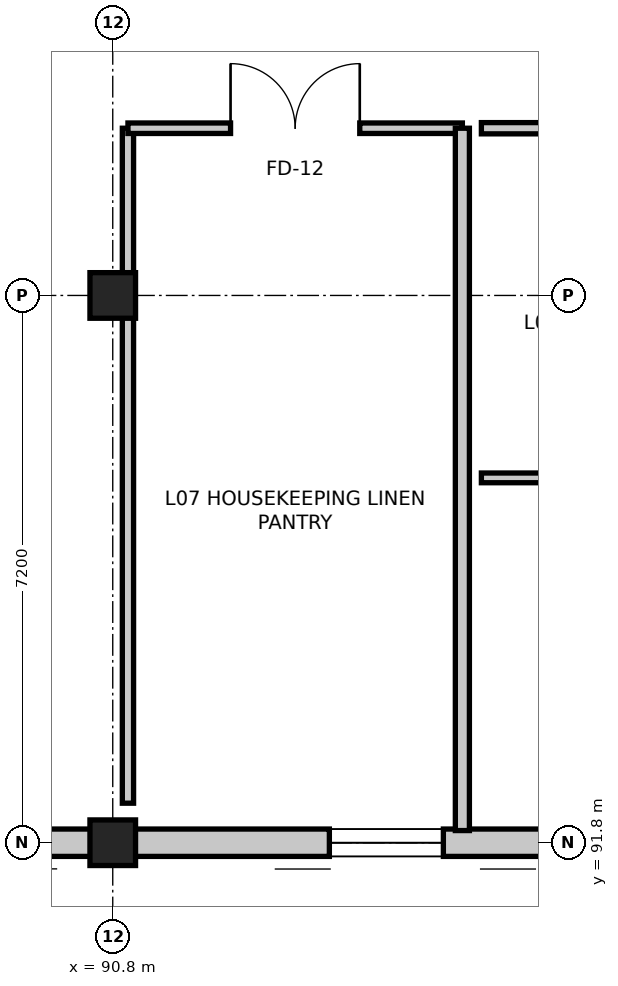
"""IFC4 building model, lengths in metres.
Left out: names, types, materials, properties, quantities, classifications, styles, units other than length and angle.
Written with IfcOpenShell. Run it as: python <this file> out.ifc"""

import sys

from ifc_helpers import new_model, si_unit, direction, frame, frame_2d, origin, origin_2d, place, context, subcontext, project, spatial, rectangle, extrude, element, fill, save


model = new_model("IFC4")
c1 = context("Model", 3, precision=1e-05, world=origin(), true_north=direction((0.0, 1.0)))
c2 = subcontext(c1, "Body", "Model", "MODEL_VIEW")
j1 = project(units=[si_unit("LENGTHUNIT", "METRE"), si_unit("PLANEANGLEUNIT", "RADIAN")], contexts=[c1])
p1 = place(None, origin())
s1 = spatial("IfcSite", under=j1, at=p1, CompositionType="ELEMENT")
p2 = place(p1, origin())
s2 = spatial("IfcBuilding", under=s1, at=p2, CompositionType="ELEMENT")
p3 = place(p2, frame((0.0, 0.0, 30.0)))
s3 = spatial("IfcBuildingStorey", under=s2, at=p3, CompositionType="ELEMENT", Elevation=30.0)
for number, where, z_axis, x_axis in (
    (1, (90.8, 91.8, 0.0), (0.0, 0.0, 1.0), (1.0, 0.0, 0.0)),
    (2, (90.8, 99.0, 0.0), (0.0, 0.0, 1.0), (1.0, 0.0, 0.0)),
):
    element("IfcColumn", number, at=place(p3, frame(where, z_axis=z_axis, x_axis=x_axis)), inside=s3, PredefinedType="COLUMN", context=c2, shape_type="SweptSolid", body=[
        extrude(rectangle(XDim=0.6, YDim=0.6, at=origin_2d()), origin(), (0.0, 0.0, 1.0), 3.6),
    ])
p4 = place(p3, frame((98.0, 91.8, 0.0), z_axis=(0.0, 0.0, 1.0), x_axis=(-1.0, 0.0, 0.0)))
e3 = element("IfcWall", 3, at=p4, inside=s3, PredefinedType="STANDARD", context=c2, shape_type="SweptSolid", body=[
    extrude(rectangle(XDim=7.2, YDim=0.36, at=frame_2d((3.6, 0.0))), origin(), (0.0, 0.0, 1.0), 2.745),
])
p5 = place(p4, frame((2.85, 0.0, 0.75)))
e4 = element("IfcOpeningElement", 4, at=p5, cuts=e3, PredefinedType="OPENING", context=c2, shape_type="SweptSolid", body=[
    extrude(rectangle(XDim=1.5, YDim=1.5, at=frame_2d((0.75, 0.75))), frame((0.0, 0.19, 0.0), z_axis=(0.0, -1.0, 0.0), x_axis=(1.0, 0.0, 0.0)), (0.0, 0.0, 1.0), 0.38),
])
p6 = place(p3, frame((90.8, 91.8, 0.0), z_axis=(0.0, 0.0, 1.0), x_axis=(-1.0, 0.0, 0.0)))
e5 = element("IfcWall", 5, at=p6, inside=s3, PredefinedType="STANDARD", context=c2, shape_type="SweptSolid", body=[
    extrude(rectangle(XDim=7.2, YDim=0.36, at=frame_2d((3.6, 0.0))), origin(), (0.0, 0.0, 1.0), 2.745),
])
p7 = place(p6, frame((2.85, 0.0, 0.75)))
e6 = element("IfcOpeningElement", 6, at=p7, cuts=e5, PredefinedType="OPENING", context=c2, shape_type="SweptSolid", body=[
    extrude(rectangle(XDim=1.5, YDim=1.5, at=frame_2d((0.75, 0.75))), frame((0.0, 0.19, 0.0), z_axis=(0.0, -1.0, 0.0), x_axis=(1.0, 0.0, 0.0)), (0.0, 0.0, 1.0), 0.38),
])
p8 = place(p3, frame((91.0, 92.32, 0.0), z_axis=(0.0, 0.0, 1.0), x_axis=(0.0, 1.0, 0.0)))
e7 = element("IfcWall", 7, at=p8, inside=s3, PredefinedType="PARTITIONING", context=c2, shape_type="SweptSolid", body=[
    extrude(rectangle(XDim=8.88, YDim=0.148, at=frame_2d((4.44, 0.0))), origin(), (0.0, 0.0, 1.0), 2.695),
])
p9 = place(p3, frame((91.0, 101.2, 0.0), z_axis=(0.0, 0.0, 1.0), x_axis=(1.0, 0.0, 0.0)))
e8 = element("IfcWall", 8, at=p9, inside=s3, PredefinedType="PARTITIONING", context=c2, shape_type="SweptSolid", body=[
    extrude(rectangle(XDim=4.4, YDim=0.138, at=frame_2d((2.2, 0.0))), origin(), (0.0, 0.0, 1.0), 2.695),
])
p10 = place(p9, frame((1.35, 0.0, 0.0)))
e9 = element("IfcOpeningElement", 9, at=p10, cuts=e8, PredefinedType="OPENING", context=c2, shape_type="SweptSolid", body=[
    extrude(rectangle(XDim=1.7, YDim=2.25, at=frame_2d((0.85, 1.125))), frame((0.0, 0.079, 0.0), z_axis=(0.0, -1.0, 0.0), x_axis=(1.0, 0.0, 0.0)), (0.0, 0.0, 1.0), 0.158),
])
p11 = place(p3, frame((95.4, 101.2, 0.0), z_axis=(0.0, 0.0, 1.0), x_axis=(0.0, -1.0, 0.0)))
e10 = element("IfcWall", 10, at=p11, inside=s3, PredefinedType="PARTITIONING", context=c2, shape_type="SweptSolid", body=[
    extrude(rectangle(XDim=9.24, YDim=0.185, at=frame_2d((4.62, 0.0))), origin(), (0.0, 0.0, 1.0), 2.745),
])
p12 = place(p3, frame((95.65, 101.2, 0.0), z_axis=(0.0, 0.0, 1.0), x_axis=(1.0, 0.0, 0.0)))
e11 = element("IfcWall", 11, at=p12, inside=s3, PredefinedType="PARTITIONING", context=c2, shape_type="SweptSolid", body=[
    extrude(rectangle(XDim=3.25, YDim=0.148, at=frame_2d((1.625, 0.0))), origin(), (0.0, 0.0, 1.0), 2.695),
])
p13 = place(p12, frame((0.975, 0.0, 0.0)))
e12 = element("IfcOpeningElement", 12, at=p13, cuts=e11, PredefinedType="OPENING", context=c2, shape_type="SweptSolid", body=[
    extrude(rectangle(XDim=1.3, YDim=2.15, at=frame_2d((0.65, 1.075))), frame((0.0, 0.084, 0.0), z_axis=(0.0, -1.0, 0.0), x_axis=(1.0, 0.0, 0.0)), (0.0, 0.0, 1.0), 0.168),
])
p14 = place(p3, frame((98.9, 96.6, 0.0), z_axis=(0.0, 0.0, 1.0), x_axis=(-1.0, 0.0, 0.0)))
e13 = element("IfcWall", 13, at=p14, inside=s3, PredefinedType="PARTITIONING", context=c2, shape_type="SweptSolid", body=[
    extrude(rectangle(XDim=3.25, YDim=0.128, at=frame_2d((1.625, 0.0))), origin(), (0.0, 0.0, 1.0), 2.695),
])
p15 = place(p5, origin())
e14 = element("IfcWindow", 14, at=p15, inside=s3, PartitioningType="SINGLE_PANEL", PredefinedType="WINDOW", context=c2, shape_type="SweptSolid", body=[
    extrude(rectangle(XDim=1.5, YDim=1.5, at=frame_2d((0.75, 0.75))), frame((0.0, 0.03, 0.0), z_axis=(0.0, -1.0, 0.0), x_axis=(1.0, 0.0, 0.0)), (0.0, 0.0, 1.0), 0.06),
])
fill(e4, e14)
p16 = place(p10, origin())
e15 = element("IfcDoor", 15, at=p16, inside=s3, OperationType="DOUBLE_DOOR_SINGLE_SWING", PredefinedType="DOOR", context=c2, shape_type="SweptSolid", body=[
    extrude(rectangle(XDim=1.7, YDim=2.25, at=frame_2d((0.85, 1.125))), frame((0.0, 0.025, 0.0), z_axis=(0.0, -1.0, 0.0), x_axis=(1.0, 0.0, 0.0)), (0.0, 0.0, 1.0), 0.05),
])
fill(e9, e15)
save(model, sys.argv[1])
